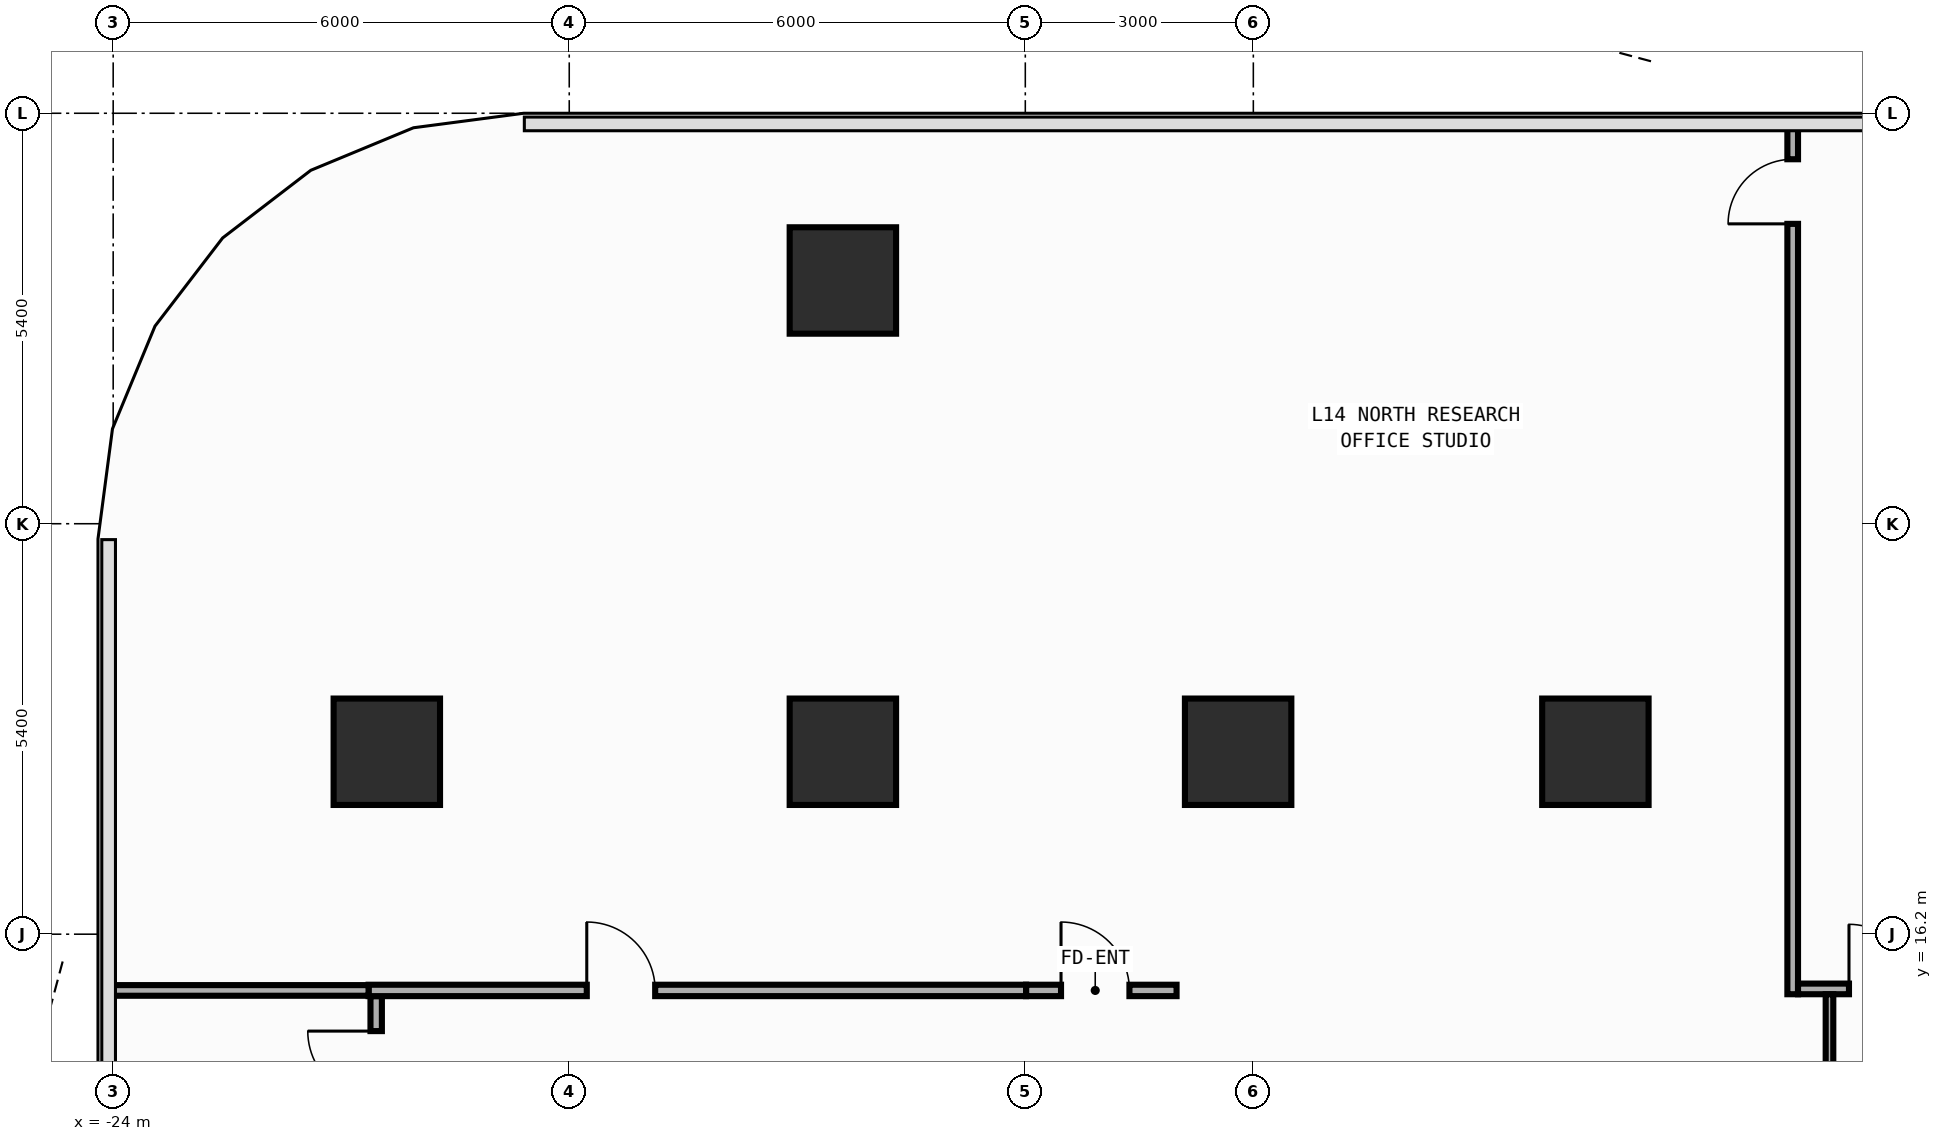
"""IFC4 building model, lengths in metres.
Left out: names, types, materials, properties, quantities, classifications, styles, units other than length and angle.
Written with IfcOpenShell. Run it as: python <this file> out.ifc"""

import sys

from ifc_helpers import new_model, si_unit, direction, frame, frame_2d, origin, origin_2d, place, context, subcontext, project, spatial, rectangle, extrude, element, fill, save


model = new_model("IFC4")
c1 = context("Model", 3, precision=1e-05, world=origin(), true_north=direction((0.0, 1.0)))
c2 = subcontext(c1, "Body", "Model", "MODEL_VIEW")
j1 = project(units=[si_unit("LENGTHUNIT", "METRE"), si_unit("PLANEANGLEUNIT", "RADIAN")], contexts=[c1])
p1 = place(None, origin())
s1 = spatial("IfcSite", under=j1, at=p1, CompositionType="ELEMENT")
p2 = place(p1, origin())
s2 = spatial("IfcBuilding", under=s1, at=p2, CompositionType="ELEMENT")
p3 = place(p2, frame((0.0, 0.0, 59.6)))
s3 = spatial("IfcBuildingStorey", under=s2, at=p3, CompositionType="ELEMENT", Elevation=59.6)
for number, where, z_axis, x_axis in (
    (1, (-9.2, 18.6, 0.0), (0.0, 0.0, 1.0), (1.0, 0.0, 0.0)),
    (2, (-20.4, 18.6, 0.0), (0.0, 0.0, 1.0), (1.0, 0.0, 0.0)),
    (3, (-14.4, 18.6, 0.0), (0.0, 0.0, 1.0), (1.0, 0.0, 0.0)),
    (4, (-4.5, 18.6, 0.0), (0.0, 0.0, 1.0), (1.0, 0.0, 0.0)),
    (5, (-14.4, 24.8, 0.0), (0.0, 0.0, 1.0), (1.0, 0.0, 0.0)),
):
    element("IfcColumn", number, at=place(p3, frame(where, z_axis=z_axis, x_axis=x_axis)), inside=s3, PredefinedType="COLUMN", context=c2, shape_type="SweptSolid", body=[
        extrude(rectangle(XDim=1.4, YDim=1.4, at=origin_2d()), origin(), (0.0, 0.0, 1.0), 4.2),
    ])
p4 = place(p3, frame((-11.99, 15.46, 0.0), z_axis=(0.0, 0.0, 1.0), x_axis=(1.0, 0.0, 0.0)))
e6 = element("IfcWall", 6, at=p4, inside=s3, PredefinedType="PARTITIONING", context=c2, shape_type="SweptSolid", body=[
    extrude(rectangle(XDim=1.98, YDim=0.15, at=frame_2d((0.99, 0.0))), origin(), (0.0, 0.0, 1.0), 3.94),
])
p5 = place(p4, frame((0.46, 0.0, 0.0)))
e7 = element("IfcOpeningElement", 7, at=p5, cuts=e6, PredefinedType="OPENING", context=c2, shape_type="SweptSolid", body=[
    extrude(rectangle(XDim=0.9, YDim=2.15, at=frame_2d((0.45, 1.075))), frame((0.0, 0.085, 0.0), z_axis=(0.0, -1.0, 0.0), x_axis=(1.0, 0.0, 0.0)), (0.0, 0.0, 1.0), 0.17),
])
p6 = place(p3, frame((-20.54, 13.36, 0.0), z_axis=(0.0, 0.0, 1.0), x_axis=(0.0, 1.0, 0.0)))
e8 = element("IfcWall", 8, at=p6, inside=s3, PredefinedType="PARTITIONING", context=c2, shape_type="SweptSolid", body=[
    extrude(rectangle(XDim=2.025, YDim=0.15, at=frame_2d((1.012, 0.0))), origin(), (0.0, 0.0, 1.0), 3.94),
])
p7 = place(p6, frame((0.665, 0.0, 0.0)))
e9 = element("IfcOpeningElement", 9, at=p7, cuts=e8, PredefinedType="OPENING", context=c2, shape_type="SweptSolid", body=[
    extrude(rectangle(XDim=0.9, YDim=2.15, at=frame_2d((0.45, 1.075))), frame((0.0, 0.085, 0.0), z_axis=(0.0, -1.0, 0.0), x_axis=(1.0, 0.0, 0.0)), (0.0, 0.0, 1.0), 0.17),
])
p8 = place(p3, frame((-20.64, 15.46, 0.0), z_axis=(0.0, 0.0, 1.0), x_axis=(1.0, 0.0, 0.0)))
e10 = element("IfcWall", 10, at=p8, inside=s3, PredefinedType="PARTITIONING", context=c2, shape_type="SweptSolid", body=[
    extrude(rectangle(XDim=8.65, YDim=0.15, at=frame_2d((4.325, 0.0))), origin(), (0.0, 0.0, 1.0), 3.94),
])
p9 = place(p8, frame((2.871, 0.0, 0.0)))
e11 = element("IfcOpeningElement", 11, at=p9, cuts=e10, PredefinedType="OPENING", context=c2, shape_type="SweptSolid", body=[
    extrude(rectangle(XDim=0.9, YDim=2.15, at=frame_2d((0.45, 1.075))), frame((0.0, 0.085, 0.0), z_axis=(0.0, -1.0, 0.0), x_axis=(1.0, 0.0, 0.0)), (0.0, 0.0, 1.0), 0.17),
])
p10 = place(p3, frame((-24.055, 15.46, 0.0), z_axis=(0.0, 0.0, 1.0), x_axis=(1.0, 0.0, 0.0)))
e12 = element("IfcWall", 12, at=p10, inside=s3, PredefinedType="PARTITIONING", context=c2, shape_type="SweptSolid", body=[
    extrude(rectangle(XDim=3.415, YDim=0.14, at=frame_2d((1.708, 0.0))), origin(), (0.0, 0.0, 1.0), 3.94),
])
p11 = place(p3, frame((-1.904, 15.41, 0.0), z_axis=(0.0, 0.0, 1.0), x_axis=(0.0, 1.0, 0.0)))
e13 = element("IfcWall", 13, at=p11, inside=s3, PredefinedType="PARTITIONING", context=c2, shape_type="SweptSolid", body=[
    extrude(rectangle(XDim=11.445, YDim=0.14, at=frame_2d((5.723, 0.0))), origin(), (0.0, 0.0, 1.0), 3.94),
])
p12 = place(p11, frame((10.135, 0.0, 0.0)))
e14 = element("IfcOpeningElement", 14, at=p12, cuts=e13, PredefinedType="OPENING", context=c2, shape_type="SweptSolid", body=[
    extrude(rectangle(XDim=0.85, YDim=2.1, at=frame_2d((0.425, 1.05))), frame((0.0, 0.08, 0.0), z_axis=(0.0, -1.0, 0.0), x_axis=(1.0, 0.0, 0.0)), (0.0, 0.0, 1.0), 0.16),
])
p13 = place(p3, frame((-1.834, 15.48, 0.0), z_axis=(0.0, 0.0, 1.0), x_axis=(1.0, 0.0, 0.0)))
e15 = element("IfcWall", 15, at=p13, inside=s3, PredefinedType="PARTITIONING", context=c2, shape_type="SweptSolid", body=[
    extrude(rectangle(XDim=3.454, YDim=0.14, at=frame_2d((1.727, 0.0))), origin(), (0.0, 0.0, 1.0), 3.94),
])
p14 = place(p13, frame((0.67, 0.0, 0.0)))
e16 = element("IfcOpeningElement", 16, at=p14, cuts=e15, PredefinedType="OPENING", context=c2, shape_type="SweptSolid", body=[
    extrude(rectangle(XDim=0.85, YDim=2.1, at=frame_2d((0.425, 1.05))), frame((0.0, 0.08, 0.0), z_axis=(0.0, -1.0, 0.0), x_axis=(1.0, 0.0, 0.0)), (0.0, 0.0, 1.0), 0.16),
])
p15 = place(p3, frame((-1.42, 9.15, 0.0), z_axis=(0.0, 0.0, 1.0), x_axis=(0.0, 1.0, 0.0)))
e17 = element("IfcWall", 17, at=p15, inside=s3, PredefinedType="PARTITIONING", context=c2, shape_type="SweptSolid", body=[
    extrude(rectangle(XDim=6.26, YDim=0.1, at=frame_2d((3.13, 0.0))), origin(), (0.0, 0.0, 1.0), 3.94),
])
p16 = place(p5, origin())
e18 = element("IfcDoor", 18, at=p16, inside=s3, OperationType="SINGLE_SWING_LEFT", PredefinedType="DOOR", context=c2, shape_type="SweptSolid", body=[
    extrude(rectangle(XDim=0.9, YDim=2.15, at=frame_2d((0.45, 1.075))), frame((0.0, 0.025, 0.0), z_axis=(0.0, -1.0, 0.0), x_axis=(1.0, 0.0, 0.0)), (0.0, 0.0, 1.0), 0.05),
])
fill(e7, e18)
p17 = place(p7, origin())
e19 = element("IfcDoor", 19, at=p17, inside=s3, OperationType="SINGLE_SWING_RIGHT", PredefinedType="DOOR", context=c2, shape_type="SweptSolid", body=[
    extrude(rectangle(XDim=0.9, YDim=2.15, at=frame_2d((0.45, 1.075))), frame((0.0, 0.025, 0.0), z_axis=(0.0, -1.0, 0.0), x_axis=(1.0, 0.0, 0.0)), (0.0, 0.0, 1.0), 0.05),
])
fill(e9, e19)
p18 = place(p9, origin())
e20 = element("IfcDoor", 20, at=p18, inside=s3, OperationType="SINGLE_SWING_LEFT", PredefinedType="DOOR", context=c2, shape_type="SweptSolid", body=[
    extrude(rectangle(XDim=0.9, YDim=2.15, at=frame_2d((0.45, 1.075))), frame((0.0, 0.025, 0.0), z_axis=(0.0, -1.0, 0.0), x_axis=(1.0, 0.0, 0.0)), (0.0, 0.0, 1.0), 0.05),
])
fill(e11, e20)
p19 = place(p12, origin())
e21 = element("IfcDoor", 21, at=p19, inside=s3, OperationType="SINGLE_SWING_LEFT", PredefinedType="DOOR", context=c2, shape_type="SweptSolid", body=[
    extrude(rectangle(XDim=0.85, YDim=2.1, at=frame_2d((0.425, 1.05))), frame((0.0, 0.025, 0.0), z_axis=(0.0, -1.0, 0.0), x_axis=(1.0, 0.0, 0.0)), (0.0, 0.0, 1.0), 0.05),
])
fill(e14, e21)
p20 = place(p14, origin())
e22 = element("IfcDoor", 22, at=p20, inside=s3, OperationType="SINGLE_SWING_LEFT", PredefinedType="DOOR", context=c2, shape_type="SweptSolid", body=[
    extrude(rectangle(XDim=0.85, YDim=2.1, at=frame_2d((0.425, 1.05))), frame((0.0, 0.025, 0.0), z_axis=(0.0, -1.0, 0.0), x_axis=(1.0, 0.0, 0.0)), (0.0, 0.0, 1.0), 0.05),
])
fill(e16, e22)
save(model, sys.argv[1])
